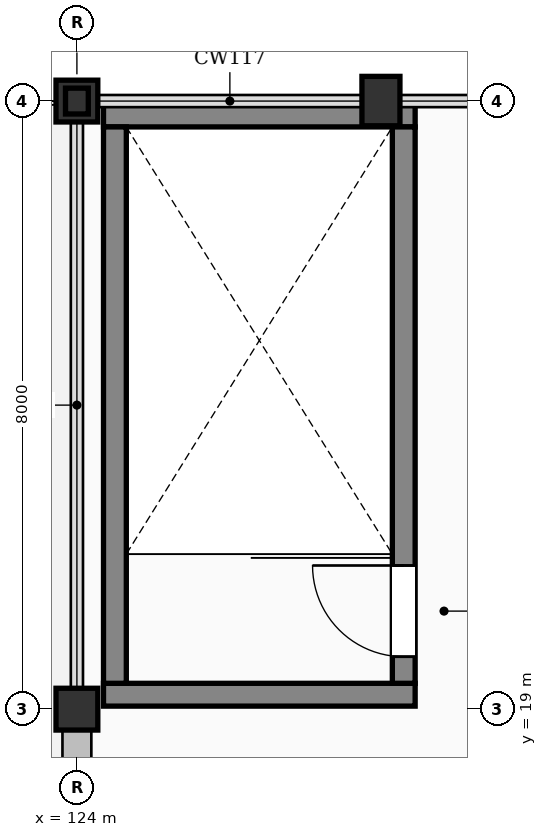
"""IFC4 building model, lengths in metres.
Left out: names, types, materials, properties, quantities, classifications, styles, units other than length and angle.
Written with IfcOpenShell. Run it as: python <this file> out.ifc"""

import sys

from ifc_helpers import new_model, si_unit, direction, frame, frame_2d, origin, origin_2d, place, context, subcontext, project, spatial, rectangle, i_section, extrude, element, fill, save


model = new_model("IFC4")
c1 = context("Model", 3, precision=1e-05, world=origin(), true_north=direction((0.0, 1.0)))
c2 = subcontext(c1, "Body", "Model", "MODEL_VIEW")
j1 = project(units=[si_unit("LENGTHUNIT", "METRE"), si_unit("PLANEANGLEUNIT", "RADIAN")], contexts=[c1])
p1 = place(None, origin())
s1 = spatial("IfcSite", under=j1, at=p1, CompositionType="ELEMENT")
p2 = place(p1, origin())
s2 = spatial("IfcBuilding", under=s1, at=p2, CompositionType="ELEMENT")
p3 = place(p2, frame((0.0, 0.0, 4.8)))
s3 = spatial("IfcBuildingStorey", under=s2, at=p3, CompositionType="ELEMENT", Elevation=4.8)
for number, where, z_axis, x_axis in (
    (1, (124.0, 19.0, 0.0), (0.0, 0.0, 1.0), (1.0, 0.0, 0.0)),
    (2, (124.0, 27.0, 0.0), (0.0, 0.0, 1.0), (1.0, 0.0, 0.0)),
):
    element("IfcColumn", number, at=place(p3, frame(where, z_axis=z_axis, x_axis=x_axis)), inside=s3, PredefinedType="COLUMN", context=c2, shape_type="SweptSolid", body=[
        extrude(rectangle(XDim=0.55, YDim=0.55, at=origin_2d()), origin(), (0.0, 0.0, 1.0), 4.5),
    ])
p4 = place(p3, frame((128.0, 27.0, 0.0), z_axis=(0.0, 0.0, 1.0), x_axis=(1.0, 0.0, 0.0)))
e3 = element("IfcColumn", 3, at=p4, inside=s3, PredefinedType="PILASTER", context=c2, shape_type="SweptSolid", body=[
    extrude(rectangle(XDim=0.5, YDim=0.65, at=origin_2d()), origin(), (0.0, 0.0, 1.0), 4.5),
])
p5 = place(p3, frame((124.0, 27.0, 4.5), z_axis=(0.0, 0.0, 1.0), x_axis=(1.0, 0.0, 0.0)))
e4 = element("IfcColumn", 4, at=p5, inside=s3, PredefinedType="COLUMN", context=c2, shape_type="SweptSolid", body=[
    extrude(i_section(OverallWidth=0.3, OverallDepth=0.34, WebThickness=0.012, FlangeThickness=0.021, FilletRadius=0.027, at=origin_2d()), origin(), (0.0, 0.0, 1.0), 1.564),
])
p6 = place(p3, frame((124.0, 11.275, 0.0), z_axis=(0.0, 0.0, 1.0), x_axis=(0.0, 1.0, 0.0)))
e5 = element("IfcWall", 5, at=p6, inside=s3, PredefinedType="SOLIDWALL", context=c2, shape_type="SweptSolid", body=[
    extrude(rectangle(XDim=7.45, YDim=0.38, at=frame_2d((3.725, 0.0))), origin(), (0.0, 0.0, 1.0), 3.585),
])
p7 = place(p6, frame((2.9, 0.0, 0.0)))
e6 = element("IfcOpeningElement", 6, at=p7, cuts=e5, PredefinedType="OPENING", context=c2, shape_type="SweptSolid", body=[
    extrude(rectangle(XDim=1.65, YDim=2.25, at=frame_2d((0.825, 1.125))), frame((0.0, 0.2, 0.0), z_axis=(0.0, -1.0, 0.0), x_axis=(1.0, 0.0, 0.0)), (0.0, 0.0, 1.0), 0.4),
])
for number, where, z_axis, x_axis in (
    (7, (124.35, 19.19, 0.0), (0.0, 0.0, 1.0), (1.0, 0.0, 0.0)),
    (8, (128.45, 26.81, 0.0), (0.0, 0.0, 1.0), (-1.0, 0.0, 0.0)),
):
    element("IfcWall", number, at=place(p3, frame(where, z_axis=z_axis, x_axis=x_axis)), inside=s3, PredefinedType="SHEAR", context=c2, shape_type="SweptSolid", body=[
        extrude(rectangle(XDim=4.1, YDim=0.3, at=frame_2d((2.05, 0.0))), origin(), (0.0, 0.0, 1.0), 4.25),
    ])
p8 = place(p3, frame((124.5, 19.34, 0.0), z_axis=(0.0, 0.0, 1.0), x_axis=(0.0, 1.0, 0.0)))
e9 = element("IfcWall", 9, at=p8, inside=s3, PredefinedType="SHEAR", context=c2, shape_type="SweptSolid", body=[
    extrude(rectangle(XDim=7.32, YDim=0.3, at=frame_2d((3.66, 0.0))), origin(), (0.0, 0.0, 1.0), 4.25),
])
p9 = place(p3, frame((128.3, 19.34, 0.0), z_axis=(0.0, 0.0, 1.0), x_axis=(0.0, 1.0, 0.0)))
e10 = element("IfcWall", 10, at=p9, inside=s3, PredefinedType="SHEAR", context=c2, shape_type="SweptSolid", body=[
    extrude(rectangle(XDim=7.32, YDim=0.3, at=frame_2d((3.66, 0.0))), origin(), (0.0, 0.0, 1.0), 4.25),
])
p10 = place(p9, frame((0.35, 0.0, 0.0)))
e11 = element("IfcOpeningElement", 11, at=p10, cuts=e10, PredefinedType="OPENING", context=c2, shape_type="SweptSolid", body=[
    extrude(rectangle(XDim=1.2, YDim=2.15, at=frame_2d((0.6, 1.075))), frame((0.0, 0.16, 0.0), z_axis=(0.0, -1.0, 0.0), x_axis=(1.0, 0.0, 0.0)), (0.0, 0.0, 1.0), 0.32),
])
p11 = place(p10, origin())
e12 = element("IfcDoor", 12, at=p11, inside=s3, OperationType="SINGLE_SWING_RIGHT", PredefinedType="DOOR", context=c2, shape_type="SweptSolid", body=[
    extrude(rectangle(XDim=1.2, YDim=2.15, at=frame_2d((0.6, 1.075))), frame((0.0, 0.025, 0.0), z_axis=(0.0, -1.0, 0.0), x_axis=(1.0, 0.0, 0.0)), (0.0, 0.0, 1.0), 0.05),
])
fill(e11, e12)
save(model, sys.argv[1])
